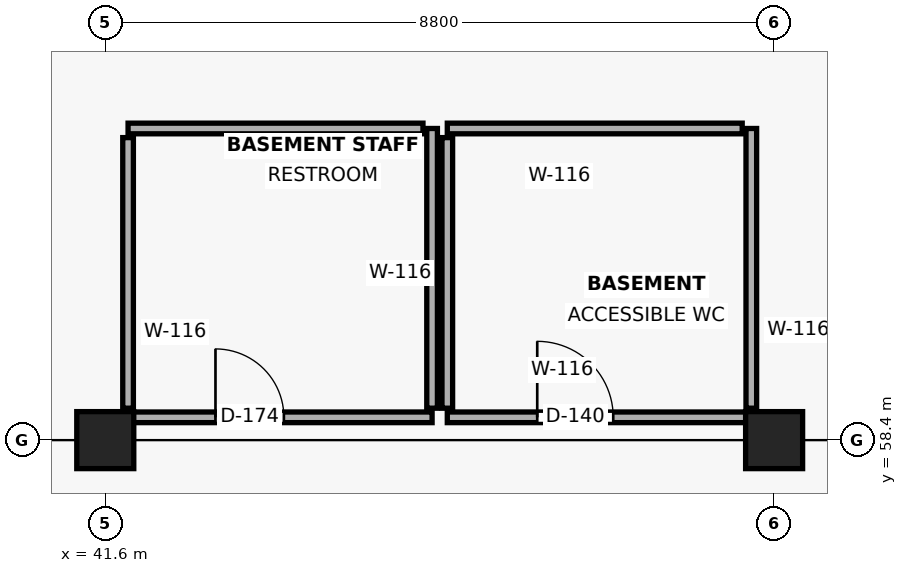
"""IFC4 building model, lengths in metres.
Left out: names, types, materials, properties, quantities, classifications, styles, units other than length and angle.
Written with IfcOpenShell. Run it as: python <this file> out.ifc"""

import sys

from ifc_helpers import new_model, si_unit, direction, frame, frame_2d, origin, origin_2d, place, context, subcontext, project, spatial, rectangle, extrude, element, fill, save


model = new_model("IFC4")
c1 = context("Model", 3, precision=1e-05, world=origin(), true_north=direction((0.0, 1.0)))
c2 = subcontext(c1, "Body", "Model", "MODEL_VIEW")
j1 = project(units=[si_unit("LENGTHUNIT", "METRE"), si_unit("PLANEANGLEUNIT", "RADIAN")], contexts=[c1])
p1 = place(None, origin())
s1 = spatial("IfcSite", under=j1, at=p1, CompositionType="ELEMENT")
p2 = place(p1, origin())
s2 = spatial("IfcBuilding", under=s1, at=p2, CompositionType="ELEMENT")
p3 = place(p2, frame((0.0, 0.0, -4.5)))
s3 = spatial("IfcBuildingStorey", under=s2, at=p3, CompositionType="ELEMENT", Elevation=-4.5)
for number, where, z_axis, x_axis in (
    (1, (41.6, 58.4, 0.0), (0.0, 0.0, 1.0), (1.0, 0.0, 0.0)),
    (2, (50.4, 58.4, 0.0), (0.0, 0.0, 1.0), (1.0, 0.0, 0.0)),
):
    element("IfcColumn", number, at=place(p3, frame(where, z_axis=z_axis, x_axis=x_axis)), inside=s3, PredefinedType="COLUMN", context=c2, shape_type="SweptSolid", body=[
        extrude(rectangle(XDim=0.75, YDim=0.75, at=origin_2d()), origin(), (0.0, 0.0, 1.0), 4.5),
    ])
p4 = place(p3, frame((41.92, 58.7, 0.0), z_axis=(0.0, 0.0, 1.0), x_axis=(1.0, 0.0, 0.0)))
e3 = element("IfcWall", 3, at=p4, inside=s3, PredefinedType="PLUMBINGWALL", context=c2, shape_type="SweptSolid", body=[
    extrude(rectangle(XDim=3.98, YDim=0.14, at=frame_2d((1.99, 0.0))), origin(), (0.0, 0.0, 1.0), 4.14),
])
p5 = place(p4, frame((1.13, 0.0, 0.0)))
e4 = element("IfcOpeningElement", 4, at=p5, cuts=e3, PredefinedType="OPENING", context=c2, shape_type="SweptSolid", body=[
    extrude(rectangle(XDim=0.9, YDim=2.15, at=frame_2d((0.45, 1.075))), frame((0.0, 0.082, 0.0), z_axis=(0.0, -1.0, 0.0), x_axis=(1.0, 0.0, 0.0)), (0.0, 0.0, 1.0), 0.164),
])
p6 = place(p3, frame((45.9, 58.82, 0.0), z_axis=(0.0, 0.0, 1.0), x_axis=(0.0, 1.0, 0.0)))
e5 = element("IfcWall", 5, at=p6, inside=s3, PredefinedType="PLUMBINGWALL", context=c2, shape_type="SweptSolid", body=[
    extrude(rectangle(XDim=3.68, YDim=0.14, at=frame_2d((1.84, 0.0))), origin(), (0.0, 0.0, 1.0), 4.14),
])
p7 = place(p3, frame((45.78, 62.5, 0.0), z_axis=(0.0, 0.0, 1.0), x_axis=(-1.0, 0.0, 0.0)))
e6 = element("IfcWall", 6, at=p7, inside=s3, PredefinedType="PLUMBINGWALL", context=c2, shape_type="SweptSolid", body=[
    extrude(rectangle(XDim=3.88, YDim=0.14, at=frame_2d((1.94, 0.0))), origin(), (0.0, 0.0, 1.0), 4.14),
])
p8 = place(p3, frame((41.9, 62.38, 0.0), z_axis=(0.0, 0.0, 1.0), x_axis=(0.0, -1.0, 0.0)))
e7 = element("IfcWall", 7, at=p8, inside=s3, PredefinedType="PLUMBINGWALL", context=c2, shape_type="SweptSolid", body=[
    extrude(rectangle(XDim=3.56, YDim=0.14, at=frame_2d((1.78, 0.0))), origin(), (0.0, 0.0, 1.0), 4.14),
])
p9 = place(p3, frame((46.1, 58.7, 0.0), z_axis=(0.0, 0.0, 1.0), x_axis=(1.0, 0.0, 0.0)))
e8 = element("IfcWall", 8, at=p9, inside=s3, PredefinedType="PLUMBINGWALL", context=c2, shape_type="SweptSolid", body=[
    extrude(rectangle(XDim=3.98, YDim=0.14, at=frame_2d((1.99, 0.0))), origin(), (0.0, 0.0, 1.0), 4.14),
])
p10 = place(p9, frame((1.183, 0.0, 0.0)))
e9 = element("IfcOpeningElement", 9, at=p10, cuts=e8, PredefinedType="OPENING", context=c2, shape_type="SweptSolid", body=[
    extrude(rectangle(XDim=1.0, YDim=2.15, at=frame_2d((0.5, 1.075))), frame((0.0, 0.082, 0.0), z_axis=(0.0, -1.0, 0.0), x_axis=(1.0, 0.0, 0.0)), (0.0, 0.0, 1.0), 0.164),
])
p11 = place(p3, frame((50.1, 58.82, 0.0), z_axis=(0.0, 0.0, 1.0), x_axis=(0.0, 1.0, 0.0)))
e10 = element("IfcWall", 10, at=p11, inside=s3, PredefinedType="PLUMBINGWALL", context=c2, shape_type="SweptSolid", body=[
    extrude(rectangle(XDim=3.68, YDim=0.14, at=frame_2d((1.84, 0.0))), origin(), (0.0, 0.0, 1.0), 4.14),
])
p12 = place(p3, frame((49.98, 62.5, 0.0), z_axis=(0.0, 0.0, 1.0), x_axis=(-1.0, 0.0, 0.0)))
e11 = element("IfcWall", 11, at=p12, inside=s3, PredefinedType="PLUMBINGWALL", context=c2, shape_type="SweptSolid", body=[
    extrude(rectangle(XDim=3.88, YDim=0.14, at=frame_2d((1.94, 0.0))), origin(), (0.0, 0.0, 1.0), 4.14),
])
p13 = place(p3, frame((46.1, 62.38, 0.0), z_axis=(0.0, 0.0, 1.0), x_axis=(0.0, -1.0, 0.0)))
e12 = element("IfcWall", 12, at=p13, inside=s3, PredefinedType="PLUMBINGWALL", context=c2, shape_type="SweptSolid", body=[
    extrude(rectangle(XDim=3.56, YDim=0.14, at=frame_2d((1.78, 0.0))), origin(), (0.0, 0.0, 1.0), 4.14),
])
p14 = place(p5, origin())
e13 = element("IfcDoor", 13, at=p14, inside=s3, OperationType="SINGLE_SWING_LEFT", PredefinedType="DOOR", context=c2, shape_type="SweptSolid", body=[
    extrude(rectangle(XDim=0.9, YDim=2.15, at=frame_2d((0.45, 1.075))), frame((0.0, 0.025, 0.0), z_axis=(0.0, -1.0, 0.0), x_axis=(1.0, 0.0, 0.0)), (0.0, 0.0, 1.0), 0.05),
])
fill(e4, e13)
p15 = place(p10, origin())
e14 = element("IfcDoor", 14, at=p15, inside=s3, OperationType="SINGLE_SWING_LEFT", PredefinedType="DOOR", context=c2, shape_type="SweptSolid", body=[
    extrude(rectangle(XDim=1.0, YDim=2.15, at=frame_2d((0.5, 1.075))), frame((0.0, 0.025, 0.0), z_axis=(0.0, -1.0, 0.0), x_axis=(1.0, 0.0, 0.0)), (0.0, 0.0, 1.0), 0.05),
])
fill(e9, e14)
save(model, sys.argv[1])
